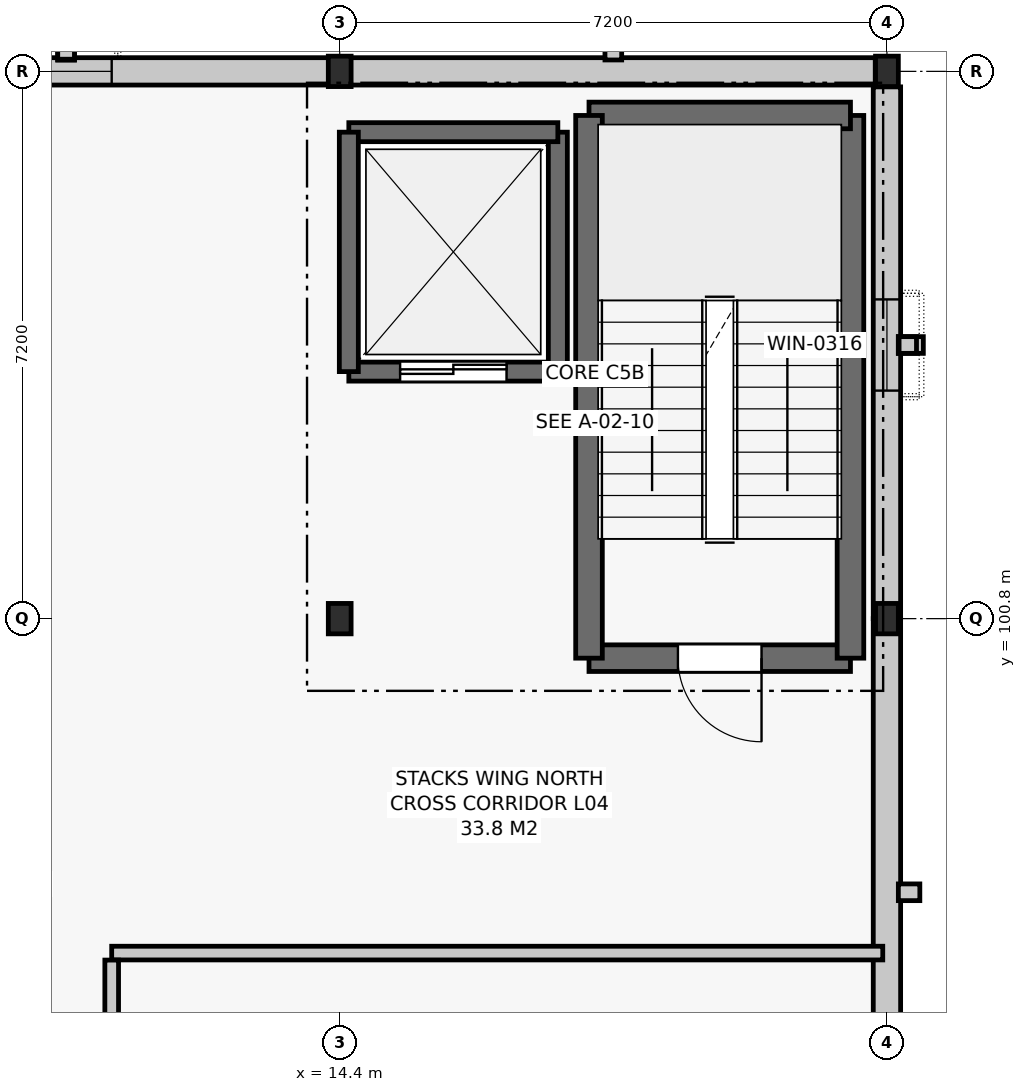
"""IFC4 building model, lengths in metres.
Left out: names, types, materials, properties, quantities, classifications, styles, units other than length and angle.
Written with IfcOpenShell. Run it as: python <this file> out.ifc"""

import sys

from ifc_helpers import new_model, si_unit, direction, frame, frame_2d, origin, origin_2d, place, context, subcontext, project, spatial, rectangle, i_section, extrude, element, fill, save


model = new_model("IFC4")
c1 = context("Model", 3, precision=1e-05, world=origin(), true_north=direction((0.0, 1.0)))
c2 = subcontext(c1, "Body", "Model", "MODEL_VIEW")
j1 = project(units=[si_unit("LENGTHUNIT", "METRE"), si_unit("PLANEANGLEUNIT", "RADIAN")], contexts=[c1])
p1 = place(None, origin())
s1 = spatial("IfcSite", under=j1, at=p1, CompositionType="ELEMENT")
p2 = place(p1, origin())
s2 = spatial("IfcBuilding", under=s1, at=p2, CompositionType="ELEMENT")
p3 = place(p2, frame((0.0, 0.0, 18.6)))
s3 = spatial("IfcBuildingStorey", under=s2, at=p3, CompositionType="ELEMENT", Elevation=18.6)
for number, where, z_axis, x_axis in (
    (1, (14.4, 100.8, 0.0), (0.0, 0.0, 1.0), (1.0, 0.0, 0.0)),
    (2, (14.4, 108.0, 0.0), (0.0, 0.0, 1.0), (1.0, 0.0, 0.0)),
    (3, (21.6, 100.8, 0.0), (0.0, 0.0, 1.0), (1.0, 0.0, 0.0)),
    (4, (21.6, 108.0, 0.0), (0.0, 0.0, 1.0), (1.0, 0.0, 0.0)),
):
    element("IfcColumn", number, at=place(p3, frame(where, z_axis=z_axis, x_axis=x_axis)), inside=s3, PredefinedType="COLUMN", context=c2, shape_type="SweptSolid", body=[
        extrude(i_section(OverallWidth=0.3, OverallDepth=0.4, WebThickness=0.013, FlangeThickness=0.024, FilletRadius=0.027, at=origin_2d()), origin(), (0.0, 0.0, 1.0), 4.2),
    ])
p4 = place(p3, frame((21.6, 93.6, 0.0), z_axis=(0.0, 0.0, 1.0), x_axis=(0.0, 1.0, 0.0)))
e5 = element("IfcWall", 5, at=p4, inside=s3, PredefinedType="SOLIDWALL", context=c2, shape_type="SweptSolid", body=[
    extrude(rectangle(XDim=7.2, YDim=0.36, at=frame_2d((3.6, 0.0))), origin(), (0.0, 0.0, 1.0), 3.22),
])
p5 = place(p3, frame((21.6, 100.8, 0.0), z_axis=(0.0, 0.0, 1.0), x_axis=(0.0, 1.0, 0.0)))
e6 = element("IfcWall", 6, at=p5, inside=s3, PredefinedType="SOLIDWALL", context=c2, shape_type="SweptSolid", body=[
    extrude(rectangle(XDim=6.996, YDim=0.36, at=frame_2d((3.498, 0.0))), origin(), (0.0, 0.0, 1.0), 3.22),
])
p6 = place(p5, frame((3.0, 0.0, 0.95)))
e7 = element("IfcOpeningElement", 7, at=p6, cuts=e6, PredefinedType="OPENING", context=c2, shape_type="SweptSolid", body=[
    extrude(rectangle(XDim=1.2, YDim=2.15, at=frame_2d((0.6, 1.075))), frame((0.0, 0.192, 0.0), z_axis=(0.0, -1.0, 0.0), x_axis=(1.0, 0.0, 0.0)), (0.0, 0.0, 1.0), 0.384),
])
p7 = place(p3, frame((21.446, 108.0, 0.0), z_axis=(0.0, 0.0, 1.0), x_axis=(-1.0, 0.0, 0.0)))
e8 = element("IfcWall", 8, at=p7, inside=s3, PredefinedType="SOLIDWALL", context=c2, shape_type="SweptSolid", body=[
    extrude(rectangle(XDim=7.046, YDim=0.36, at=frame_2d((3.523, 0.0))), origin(), (0.0, 0.0, 1.0), 3.22),
])
p8 = place(p3, frame((14.4, 108.0, 0.0), z_axis=(0.0, 0.0, 1.0), x_axis=(-1.0, 0.0, 0.0)))
e9 = element("IfcWall", 9, at=p8, inside=s3, PredefinedType="SOLIDWALL", context=c2, shape_type="SweptSolid", body=[
    extrude(rectangle(XDim=7.2, YDim=0.36, at=frame_2d((3.6, 0.0))), origin(), (0.0, 0.0, 1.0), 3.22),
])
p9 = place(p8, frame((3.0, 0.0, 0.95)))
e10 = element("IfcOpeningElement", 10, at=p9, cuts=e9, PredefinedType="OPENING", context=c2, shape_type="SweptSolid", body=[
    extrude(rectangle(XDim=1.2, YDim=2.15, at=frame_2d((0.6, 1.075))), frame((0.0, 0.192, 0.0), z_axis=(0.0, -1.0, 0.0), x_axis=(1.0, 0.0, 0.0)), (0.0, 0.0, 1.0), 0.384),
])
p10 = place(p3, frame((17.68, 100.28, 0.0), z_axis=(0.0, 0.0, 1.0), x_axis=(1.0, 0.0, 0.0)))
e11 = element("IfcWall", 11, at=p10, inside=s3, PredefinedType="SHEAR", context=c2, shape_type="SweptSolid", body=[
    extrude(rectangle(XDim=3.44, YDim=0.35, at=frame_2d((1.72, 0.0))), origin(), (0.0, 0.0, 1.0), 3.94),
])
p11 = place(p10, frame((1.17, 0.0, 0.0)))
e12 = element("IfcOpeningElement", 12, at=p11, cuts=e11, PredefinedType="OPENING", context=c2, shape_type="SweptSolid", body=[
    extrude(rectangle(XDim=1.1, YDim=2.15, at=frame_2d((0.55, 1.075))), frame((0.0, 0.187, 0.0), z_axis=(0.0, -1.0, 0.0), x_axis=(1.0, 0.0, 0.0)), (0.0, 0.0, 1.0), 0.374),
])
p12 = place(p3, frame((21.12, 100.28, 0.0), z_axis=(0.0, 0.0, 1.0), x_axis=(0.0, 1.0, 0.0)))
e13 = element("IfcWall", 13, at=p12, inside=s3, PredefinedType="SHEAR", context=c2, shape_type="SweptSolid", body=[
    extrude(rectangle(XDim=7.14, YDim=0.35, at=frame_2d((3.57, 0.0))), origin(), (0.0, 0.0, 1.0), 3.94),
])
p13 = place(p3, frame((21.12, 107.42, 0.0), z_axis=(0.0, 0.0, 1.0), x_axis=(-1.0, 0.0, 0.0)))
e14 = element("IfcWall", 14, at=p13, inside=s3, PredefinedType="SHEAR", context=c2, shape_type="SweptSolid", body=[
    extrude(rectangle(XDim=3.44, YDim=0.35, at=frame_2d((1.72, 0.0))), origin(), (0.0, 0.0, 1.0), 3.94),
])
p14 = place(p3, frame((17.68, 107.42, 0.0), z_axis=(0.0, 0.0, 1.0), x_axis=(0.0, -1.0, 0.0)))
e15 = element("IfcWall", 15, at=p14, inside=s3, PredefinedType="SHEAR", context=c2, shape_type="SweptSolid", body=[
    extrude(rectangle(XDim=7.14, YDim=0.35, at=frame_2d((3.57, 0.0))), origin(), (0.0, 0.0, 1.0), 3.94),
])
p15 = place(p3, frame((14.52, 104.05, 0.0), z_axis=(0.0, 0.0, 1.0), x_axis=(1.0, 0.0, 0.0)))
e16 = element("IfcWall", 16, at=p15, inside=s3, PredefinedType="SHEAR", context=c2, shape_type="SweptSolid", body=[
    extrude(rectangle(XDim=2.75, YDim=0.25, at=frame_2d((1.375, 0.0))), origin(), (0.0, 0.0, 1.0), 3.94),
])
p16 = place(p15, frame((0.675, 0.0, 0.0)))
e17 = element("IfcOpeningElement", 17, at=p16, cuts=e16, PredefinedType="OPENING", context=c2, shape_type="SweptSolid", body=[
    extrude(rectangle(XDim=1.4, YDim=2.2, at=frame_2d((0.7, 1.1))), frame((0.0, 0.137, 0.0), z_axis=(0.0, -1.0, 0.0), x_axis=(1.0, 0.0, 0.0)), (0.0, 0.0, 1.0), 0.274),
])
p17 = place(p3, frame((17.27, 104.05, 0.0), z_axis=(0.0, 0.0, 1.0), x_axis=(0.0, 1.0, 0.0)))
e18 = element("IfcWall", 18, at=p17, inside=s3, PredefinedType="SHEAR", context=c2, shape_type="SweptSolid", body=[
    extrude(rectangle(XDim=3.15, YDim=0.25, at=frame_2d((1.575, 0.0))), origin(), (0.0, 0.0, 1.0), 3.94),
])
p18 = place(p3, frame((17.27, 107.2, 0.0), z_axis=(0.0, 0.0, 1.0), x_axis=(-1.0, 0.0, 0.0)))
e19 = element("IfcWall", 19, at=p18, inside=s3, PredefinedType="SHEAR", context=c2, shape_type="SweptSolid", body=[
    extrude(rectangle(XDim=2.75, YDim=0.25, at=frame_2d((1.375, 0.0))), origin(), (0.0, 0.0, 1.0), 3.94),
])
p19 = place(p3, frame((14.52, 107.2, 0.0), z_axis=(0.0, 0.0, 1.0), x_axis=(0.0, -1.0, 0.0)))
e20 = element("IfcWall", 20, at=p19, inside=s3, PredefinedType="SHEAR", context=c2, shape_type="SweptSolid", body=[
    extrude(rectangle(XDim=3.15, YDim=0.25, at=frame_2d((1.575, 0.0))), origin(), (0.0, 0.0, 1.0), 3.94),
])
p20 = place(p3, frame((11.4, 96.4, 0.0), z_axis=(0.0, 0.0, 1.0), x_axis=(1.0, 0.0, 0.0)))
e21 = element("IfcWall", 21, at=p20, inside=s3, PredefinedType="PARTITIONING", context=c2, shape_type="SweptSolid", body=[
    extrude(rectangle(XDim=10.145, YDim=0.18, at=frame_2d((5.073, 0.0))), origin(), (0.0, 0.0, 1.0), 3.325),
])
p21 = place(p3, frame((11.4, 72.137, 0.0), z_axis=(0.0, 0.0, 1.0), x_axis=(0.0, 1.0, 0.0)))
e22 = element("IfcWall", 22, at=p21, inside=s3, PredefinedType="PARTITIONING", context=c2, shape_type="SweptSolid", body=[
    extrude(rectangle(XDim=24.171, YDim=0.18, at=frame_2d((12.085, 0.0))), origin(), (0.0, 0.0, 1.0), 3.375),
])
p22 = place(p21, frame((11.186, 0.0, 0.0)))
e23 = element("IfcOpeningElement", 23, at=p22, cuts=e22, PredefinedType="OPENING", context=c2, shape_type="SweptSolid", body=[
    extrude(rectangle(XDim=1.8, YDim=2.35, at=frame_2d((0.9, 1.175))), frame((0.0, 0.102, 0.0), z_axis=(0.0, -1.0, 0.0), x_axis=(1.0, 0.0, 0.0)), (0.0, 0.0, 1.0), 0.204),
])
p23 = place(p6, origin())
e24 = element("IfcWindow", 24, at=p23, inside=s3, PartitioningType="SINGLE_PANEL", PredefinedType="WINDOW", context=c2, shape_type="SweptSolid", body=[
    extrude(rectangle(XDim=1.2, YDim=2.15, at=frame_2d((0.6, 1.075))), frame((0.0, 0.03, 0.0), z_axis=(0.0, -1.0, 0.0), x_axis=(1.0, 0.0, 0.0)), (0.0, 0.0, 1.0), 0.06),
])
fill(e7, e24)
p24 = place(p9, origin())
e25 = element("IfcWindow", 25, at=p24, inside=s3, PartitioningType="SINGLE_PANEL", PredefinedType="WINDOW", context=c2, shape_type="SweptSolid", body=[
    extrude(rectangle(XDim=1.2, YDim=2.15, at=frame_2d((0.6, 1.075))), frame((0.0, 0.03, 0.0), z_axis=(0.0, -1.0, 0.0), x_axis=(1.0, 0.0, 0.0)), (0.0, 0.0, 1.0), 0.06),
])
fill(e10, e25)
p25 = place(p11, frame((1.1, 0.0, 0.0), z_axis=(0.0, 0.0, 1.0), x_axis=(-1.0, 0.0, 0.0)))
e26 = element("IfcDoor", 26, at=p25, inside=s3, OperationType="SINGLE_SWING_LEFT", PredefinedType="DOOR", context=c2, shape_type="SweptSolid", body=[
    extrude(rectangle(XDim=1.1, YDim=2.15, at=frame_2d((0.55, 1.075))), frame((0.0, 0.025, 0.0), z_axis=(0.0, -1.0, 0.0), x_axis=(1.0, 0.0, 0.0)), (0.0, 0.0, 1.0), 0.05),
])
fill(e12, e26)
p26 = place(p16, origin())
e27 = element("IfcDoor", 27, at=p26, inside=s3, OperationType="DOUBLE_DOOR_SLIDING", PredefinedType="DOOR", context=c2, shape_type="SweptSolid", body=[
    extrude(rectangle(XDim=1.4, YDim=2.2, at=frame_2d((0.7, 1.1))), frame((0.0, 0.025, 0.0), z_axis=(0.0, -1.0, 0.0), x_axis=(1.0, 0.0, 0.0)), (0.0, 0.0, 1.0), 0.05),
])
fill(e17, e27)
save(model, sys.argv[1])
